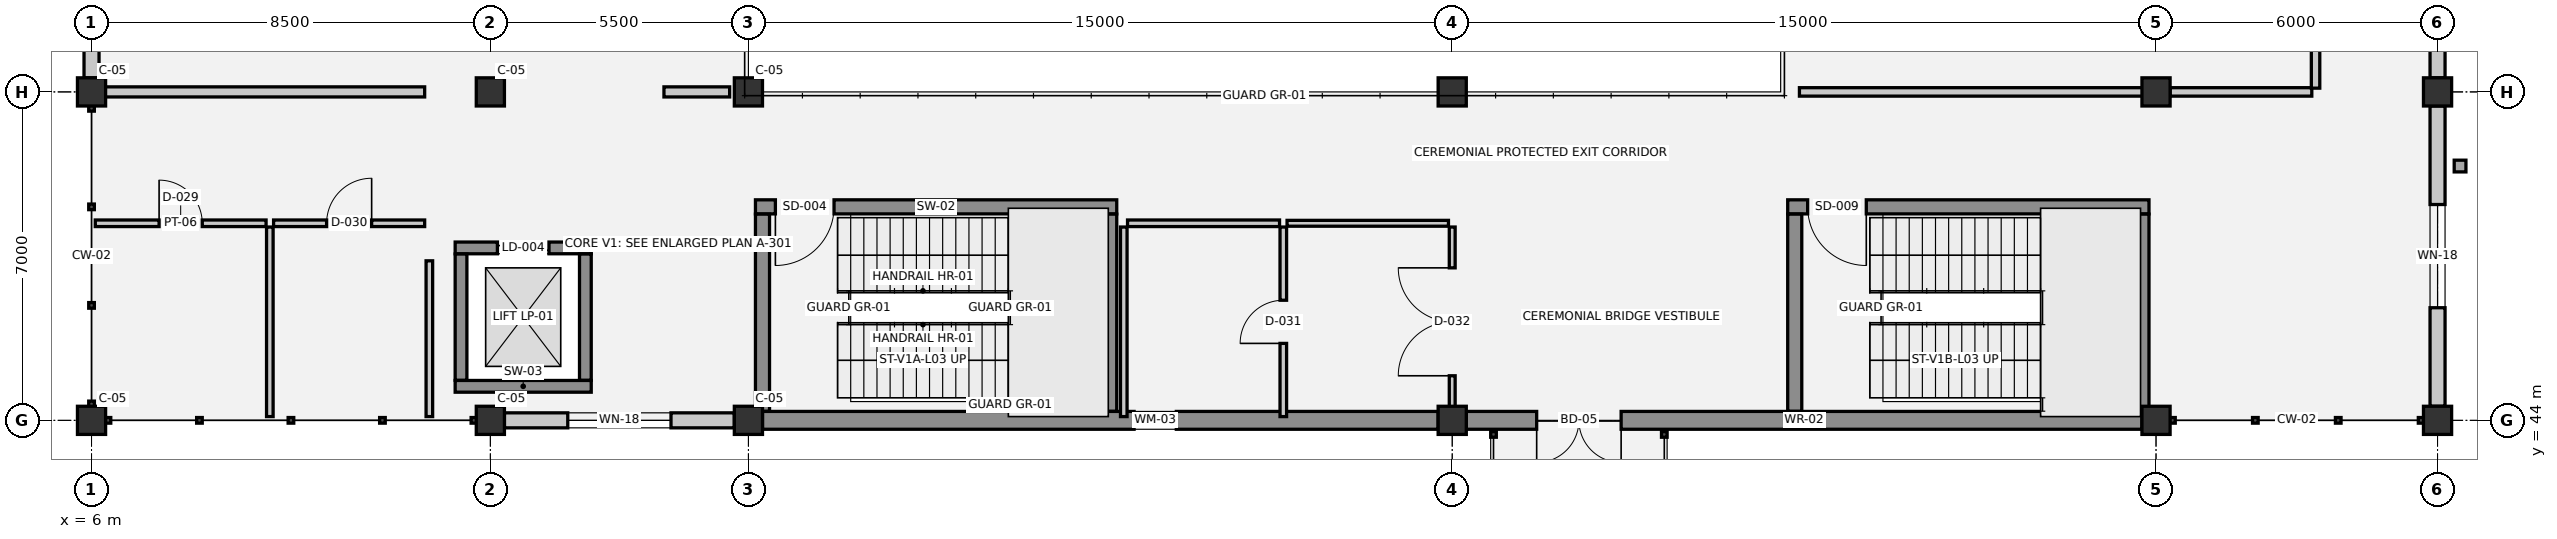
"""IFC4 building model, lengths in metres.
Left out: names, types, materials, properties, quantities, classifications, styles, units other than length and angle.
Written with IfcOpenShell. Run it as: python <this file> out.ifc"""

import sys

from ifc_helpers import new_model, si_unit, direction, frame, frame_2d, origin, origin_2d, place, context, subcontext, project, spatial, rectangle, extrude, element, fill, save


model = new_model("IFC4")
c1 = context("Model", 3, precision=1e-05, world=origin(), true_north=direction((0.0, 1.0)))
c2 = subcontext(c1, "Body", "Model", "MODEL_VIEW")
j1 = project(units=[si_unit("LENGTHUNIT", "METRE"), si_unit("PLANEANGLEUNIT", "RADIAN")], contexts=[c1])
p1 = place(None, origin())
s1 = spatial("IfcSite", under=j1, at=p1, CompositionType="ELEMENT")
p2 = place(p1, origin())
s2 = spatial("IfcBuilding", under=s1, at=p2, CompositionType="ELEMENT")
p3 = place(p2, frame((0.0, 0.0, 9.9)))
s3 = spatial("IfcBuildingStorey", under=s2, at=p3, CompositionType="ELEMENT", Elevation=9.9)
for number, where, z_axis, x_axis in (
    (1, (6.0, 44.0, 0.0), (0.0, 0.0, 1.0), (1.0, 0.0, 0.0)),
    (2, (6.0, 51.0, 0.0), (0.0, 0.0, 1.0), (1.0, 0.0, 0.0)),
    (3, (14.5, 44.0, 0.0), (0.0, 0.0, 1.0), (1.0, 0.0, 0.0)),
    (4, (14.5, 51.0, 0.0), (0.0, 0.0, 1.0), (1.0, 0.0, 0.0)),
    (5, (20.0, 44.0, 0.0), (0.0, 0.0, 1.0), (1.0, 0.0, 0.0)),
    (6, (20.0, 51.0, 0.0), (0.0, 0.0, 1.0), (1.0, 0.0, 0.0)),
    (7, (35.0, 44.0, 0.0), (0.0, 0.0, 1.0), (1.0, 0.0, 0.0)),
    (8, (35.0, 51.0, 0.0), (0.0, 0.0, 1.0), (1.0, 0.0, 0.0)),
    (9, (50.0, 44.0, 0.0), (0.0, 0.0, 1.0), (1.0, 0.0, 0.0)),
    (10, (50.0, 51.0, 0.0), (0.0, 0.0, 1.0), (1.0, 0.0, 0.0)),
    (11, (56.0, 44.0, 0.0), (0.0, 0.0, 1.0), (1.0, 0.0, 0.0)),
    (12, (56.0, 51.0, 0.0), (0.0, 0.0, 1.0), (1.0, 0.0, 0.0)),
):
    element("IfcColumn", number, at=place(p3, frame(where, z_axis=z_axis, x_axis=x_axis)), inside=s3, PredefinedType="COLUMN", context=c2, shape_type="SweptSolid", body=[
        extrude(rectangle(XDim=0.6, YDim=0.6, at=origin_2d()), origin(), (0.0, 0.0, 1.0), 4.5),
    ])
p4 = place(p3, frame((6.0, 51.3, 0.0), z_axis=(0.0, 0.0, 1.0), x_axis=(0.0, 1.0, 0.0)))
e13 = element("IfcWall", 13, at=p4, inside=s3, PredefinedType="SOLIDWALL", context=c2, shape_type="SweptSolid", body=[
    extrude(rectangle(XDim=13.4, YDim=0.32, at=frame_2d((6.7, 0.0))), origin(), (0.0, 0.0, 1.0), 3.11),
])
p5 = place(p4, frame((5.6, 0.0, 0.9)))
e14 = element("IfcOpeningElement", 14, at=p5, cuts=e13, PredefinedType="OPENING", context=c2, shape_type="SweptSolid", body=[
    extrude(rectangle(XDim=2.2, YDim=1.0, at=frame_2d((1.1, 0.5))), frame((0.0, 0.17, 0.0), z_axis=(0.0, -1.0, 0.0), x_axis=(1.0, 0.0, 0.0)), (0.0, 0.0, 1.0), 0.34),
])
p6 = place(p3, frame((56.0, 64.7, 0.0), z_axis=(0.0, 0.0, 1.0), x_axis=(0.0, -1.0, 0.0)))
e15 = element("IfcWall", 15, at=p6, inside=s3, PredefinedType="SOLIDWALL", context=c2, shape_type="SweptSolid", body=[
    extrude(rectangle(XDim=13.4, YDim=0.32, at=frame_2d((6.7, 0.0))), origin(), (0.0, 0.0, 1.0), 3.11),
])
p7 = place(p6, frame((9.975, 0.0, 0.0)))
e16 = element("IfcOpeningElement", 16, at=p7, cuts=e15, PredefinedType="OPENING", context=c2, shape_type="SweptSolid", body=[
    extrude(rectangle(XDim=1.65, YDim=2.2, at=frame_2d((0.825, 1.1))), frame((0.0, 0.17, 0.0), z_axis=(0.0, -1.0, 0.0), x_axis=(1.0, 0.0, 0.0)), (0.0, 0.0, 1.0), 0.34),
])
p8 = place(p3, frame((56.0, 50.7, 0.0), z_axis=(0.0, 0.0, 1.0), x_axis=(0.0, -1.0, 0.0)))
e17 = element("IfcWall", 17, at=p8, inside=s3, PredefinedType="SOLIDWALL", context=c2, shape_type="SweptSolid", body=[
    extrude(rectangle(XDim=6.4, YDim=0.32, at=frame_2d((3.2, 0.0))), origin(), (0.0, 0.0, 1.0), 3.11),
])
p9 = place(p8, frame((2.1, 0.0, 0.9)))
e18 = element("IfcOpeningElement", 18, at=p9, cuts=e17, PredefinedType="OPENING", context=c2, shape_type="SweptSolid", body=[
    extrude(rectangle(XDim=2.2, YDim=1.0, at=frame_2d((1.1, 0.5))), frame((0.0, 0.17, 0.0), z_axis=(0.0, -1.0, 0.0), x_axis=(1.0, 0.0, 0.0)), (0.0, 0.0, 1.0), 0.34),
])
p10 = place(p3, frame((49.7, 44.0, 0.0), z_axis=(0.0, 0.0, 1.0), x_axis=(-1.0, 0.0, 0.0)))
e19 = element("IfcWall", 19, at=p10, inside=s3, PredefinedType="STANDARD", context=c2, shape_type="SweptSolid", body=[
    extrude(rectangle(XDim=14.4, YDim=0.38, at=frame_2d((7.2, 0.0))), origin(), (0.0, 0.0, 1.0), 3.11),
])
p11 = place(p10, frame((11.1, 0.0, 0.0)))
e20 = element("IfcOpeningElement", 20, at=p11, cuts=e19, PredefinedType="OPENING", context=c2, shape_type="SweptSolid", body=[
    extrude(rectangle(XDim=1.8, YDim=2.25, at=frame_2d((0.9, 1.125))), frame((0.0, 0.2, 0.0), z_axis=(0.0, -1.0, 0.0), x_axis=(1.0, 0.0, 0.0)), (0.0, 0.0, 1.0), 0.4),
])
p12 = place(p3, frame((34.7, 44.0, 0.0), z_axis=(0.0, 0.0, 1.0), x_axis=(-1.0, 0.0, 0.0)))
e21 = element("IfcWall", 21, at=p12, inside=s3, PredefinedType="STANDARD", context=c2, shape_type="SweptSolid", body=[
    extrude(rectangle(XDim=14.4, YDim=0.38, at=frame_2d((7.2, 0.0))), origin(), (0.0, 0.0, 1.0), 3.11),
])
p13 = place(p12, frame((5.58, 0.0, 0.95)))
e22 = element("IfcOpeningElement", 22, at=p13, cuts=e21, PredefinedType="OPENING", context=c2, shape_type="SweptSolid", body=[
    extrude(rectangle(XDim=0.9, YDim=1.6, at=frame_2d((0.45, 0.8))), frame((0.0, 0.2, 0.0), z_axis=(0.0, -1.0, 0.0), x_axis=(1.0, 0.0, 0.0)), (0.0, 0.0, 1.0), 0.4),
])
p14 = place(p3, frame((19.7, 44.0, 0.0), z_axis=(0.0, 0.0, 1.0), x_axis=(-1.0, 0.0, 0.0)))
e23 = element("IfcWall", 23, at=p14, inside=s3, PredefinedType="SOLIDWALL", context=c2, shape_type="SweptSolid", body=[
    extrude(rectangle(XDim=4.9, YDim=0.32, at=frame_2d((2.45, 0.0))), origin(), (0.0, 0.0, 1.0), 3.11),
])
p15 = place(p14, frame((1.35, 0.0, 0.9)))
e24 = element("IfcOpeningElement", 24, at=p15, cuts=e23, PredefinedType="OPENING", context=c2, shape_type="SweptSolid", body=[
    extrude(rectangle(XDim=2.2, YDim=1.0, at=frame_2d((1.1, 0.5))), frame((0.0, 0.17, 0.0), z_axis=(0.0, -1.0, 0.0), x_axis=(1.0, 0.0, 0.0)), (0.0, 0.0, 1.0), 0.34),
])
p16 = place(p3, frame((13.75, 44.725, 0.0), z_axis=(0.0, 0.0, 1.0), x_axis=(1.0, 0.0, 0.0)))
e25 = element("IfcWall", 25, at=p16, inside=s3, PredefinedType="SHEAR", context=c2, shape_type="SweptSolid", body=[
    extrude(rectangle(XDim=2.9, YDim=0.25, at=frame_2d((1.45, 0.0))), origin(), (0.0, 0.0, 1.0), 4.5),
])
p17 = place(p3, frame((16.65, 47.675, 0.0), z_axis=(0.0, 0.0, 1.0), x_axis=(-1.0, 0.0, 0.0)))
e26 = element("IfcWall", 26, at=p17, inside=s3, PredefinedType="SHEAR", context=c2, shape_type="SweptSolid", body=[
    extrude(rectangle(XDim=2.9, YDim=0.25, at=frame_2d((1.45, 0.0))), origin(), (0.0, 0.0, 1.0), 4.5),
])
p18 = place(p17, frame((0.9, 0.0, 0.0)))
e27 = element("IfcOpeningElement", 27, at=p18, cuts=e26, PredefinedType="OPENING", context=c2, shape_type="SweptSolid", body=[
    extrude(rectangle(XDim=1.1, YDim=2.15, at=frame_2d((0.55, 1.075))), frame((0.0, 0.135, 0.0), z_axis=(0.0, -1.0, 0.0), x_axis=(1.0, 0.0, 0.0)), (0.0, 0.0, 1.0), 0.27),
])
for number, where, z_axis, x_axis in (
    (28, (13.875, 47.545, 0.0), (0.0, 0.0, 1.0), (0.0, -1.0, 0.0)),
    (29, (16.525, 44.855, 0.0), (0.0, 0.0, 1.0), (0.0, 1.0, 0.0)),
):
    element("IfcWall", number, at=place(p3, frame(where, z_axis=z_axis, x_axis=x_axis)), inside=s3, PredefinedType="SHEAR", context=c2, shape_type="SweptSolid", body=[
        extrude(rectangle(XDim=2.69, YDim=0.25, at=frame_2d((1.345, 0.0))), origin(), (0.0, 0.0, 1.0), 4.5),
    ])
p19 = place(p3, frame((27.85, 48.55, 0.0), z_axis=(0.0, 0.0, 1.0), x_axis=(-1.0, 0.0, 0.0)))
e30 = element("IfcWall", 30, at=p19, inside=s3, PredefinedType="SHEAR", context=c2, shape_type="SweptSolid", body=[
    extrude(rectangle(XDim=7.7, YDim=0.3, at=frame_2d((3.85, 0.0))), origin(), (0.0, 0.0, 1.0), 4.24),
])
p20 = place(p19, frame((6.025, 0.0, 0.0)))
e31 = element("IfcOpeningElement", 31, at=p20, cuts=e30, PredefinedType="OPENING", context=c2, shape_type="SweptSolid", body=[
    extrude(rectangle(XDim=1.25, YDim=2.15, at=frame_2d((0.625, 1.075))), frame((0.0, 0.16, 0.0), z_axis=(0.0, -1.0, 0.0), x_axis=(1.0, 0.0, 0.0)), (0.0, 0.0, 1.0), 0.32),
])
for number, where, z_axis, x_axis in (
    (32, (20.3, 48.395, 0.0), (0.0, 0.0, 1.0), (0.0, -1.0, 0.0)),
    (33, (27.7, 44.195, 0.0), (0.0, 0.0, 1.0), (0.0, 1.0, 0.0)),
):
    element("IfcWall", number, at=place(p3, frame(where, z_axis=z_axis, x_axis=x_axis)), inside=s3, PredefinedType="SHEAR", context=c2, shape_type="SweptSolid", body=[
        extrude(rectangle(XDim=4.2, YDim=0.3, at=frame_2d((2.1, 0.0))), origin(), (0.0, 0.0, 1.0), 4.24),
    ])
p21 = place(p3, frame((49.85, 48.55, 0.0), z_axis=(0.0, 0.0, 1.0), x_axis=(-1.0, 0.0, 0.0)))
e34 = element("IfcWall", 34, at=p21, inside=s3, PredefinedType="SHEAR", context=c2, shape_type="SweptSolid", body=[
    extrude(rectangle(XDim=7.7, YDim=0.3, at=frame_2d((3.85, 0.0))), origin(), (0.0, 0.0, 1.0), 4.24),
])
p22 = place(p21, frame((6.025, 0.0, 0.0)))
e35 = element("IfcOpeningElement", 35, at=p22, cuts=e34, PredefinedType="OPENING", context=c2, shape_type="SweptSolid", body=[
    extrude(rectangle(XDim=1.25, YDim=2.15, at=frame_2d((0.625, 1.075))), frame((0.0, 0.16, 0.0), z_axis=(0.0, -1.0, 0.0), x_axis=(1.0, 0.0, 0.0)), (0.0, 0.0, 1.0), 0.32),
])
for number, where, z_axis, x_axis in (
    (36, (42.3, 48.395, 0.0), (0.0, 0.0, 1.0), (0.0, -1.0, 0.0)),
    (37, (49.7, 44.195, 0.0), (0.0, 0.0, 1.0), (0.0, 1.0, 0.0)),
):
    element("IfcWall", number, at=place(p3, frame(where, z_axis=z_axis, x_axis=x_axis)), inside=s3, PredefinedType="SHEAR", context=c2, shape_type="SweptSolid", body=[
        extrude(rectangle(XDim=4.2, YDim=0.3, at=frame_2d((2.1, 0.0))), origin(), (0.0, 0.0, 1.0), 4.24),
    ])
p23 = place(p3, frame((6.08, 48.2, 0.0), z_axis=(0.0, 0.0, 1.0), x_axis=(1.0, 0.0, 0.0)))
e38 = element("IfcWall", 38, at=p23, inside=s3, PredefinedType="PLUMBINGWALL", context=c2, shape_type="SweptSolid", body=[
    extrude(rectangle(XDim=3.64, YDim=0.14, at=frame_2d((1.82, 0.0))), origin(), (0.0, 0.0, 1.0), 4.14),
])
p24 = place(p23, frame((1.36, 0.0, 0.0)))
e39 = element("IfcOpeningElement", 39, at=p24, cuts=e38, PredefinedType="OPENING", context=c2, shape_type="SweptSolid", body=[
    extrude(rectangle(XDim=0.92, YDim=2.1, at=frame_2d((0.46, 1.05))), frame((0.0, 0.08, 0.0), z_axis=(0.0, -1.0, 0.0), x_axis=(1.0, 0.0, 0.0)), (0.0, 0.0, 1.0), 0.16),
])
p25 = place(p3, frame((9.88, 48.2, 0.0), z_axis=(0.0, 0.0, 1.0), x_axis=(1.0, 0.0, 0.0)))
e40 = element("IfcWall", 40, at=p25, inside=s3, PredefinedType="PLUMBINGWALL", context=c2, shape_type="SweptSolid", body=[
    extrude(rectangle(XDim=3.22, YDim=0.14, at=frame_2d((1.61, 0.0))), origin(), (0.0, 0.0, 1.0), 4.14),
])
p26 = place(p25, frame((1.13, 0.0, 0.0)))
e41 = element("IfcOpeningElement", 41, at=p26, cuts=e40, PredefinedType="OPENING", context=c2, shape_type="SweptSolid", body=[
    extrude(rectangle(XDim=0.96, YDim=2.1, at=frame_2d((0.48, 1.05))), frame((0.0, 0.08, 0.0), z_axis=(0.0, -1.0, 0.0), x_axis=(1.0, 0.0, 0.0)), (0.0, 0.0, 1.0), 0.16),
])
p27 = place(p3, frame((28.08, 48.2, 0.0), z_axis=(0.0, 0.0, 1.0), x_axis=(1.0, 0.0, 0.0)))
e42 = element("IfcWall", 42, at=p27, inside=s3, PredefinedType="PLUMBINGWALL", context=c2, shape_type="SweptSolid", body=[
    extrude(rectangle(XDim=3.24, YDim=0.14, at=frame_2d((1.62, 0.0))), origin(), (0.0, 0.0, 1.0), 4.14),
])
p28 = place(p3, frame((31.48, 48.2, 0.0), z_axis=(0.0, 0.0, 1.0), x_axis=(1.0, 0.0, 0.0)))
e43 = element("IfcWall", 43, at=p28, inside=s3, PredefinedType="PARTITIONING", context=c2, shape_type="SweptSolid", body=[
    extrude(rectangle(XDim=3.44, YDim=0.125, at=frame_2d((1.72, 0.0))), origin(), (0.0, 0.0, 1.0), 4.14),
])
p29 = place(p3, frame((6.08, 51.0, 0.0), z_axis=(0.0, 0.0, 1.0), x_axis=(1.0, 0.0, 0.0)))
e44 = element("IfcWall", 44, at=p29, inside=s3, PredefinedType="PARTITIONING", context=c2, shape_type="SweptSolid", body=[
    extrude(rectangle(XDim=7.02, YDim=0.215, at=frame_2d((3.51, 0.0))), origin(), (0.0, 0.0, 1.0), 3.53),
])
p30 = place(p3, frame((18.2, 51.0, 0.0), z_axis=(0.0, 0.0, 1.0), x_axis=(1.0, 0.0, 0.0)))
e45 = element("IfcWall", 45, at=p30, inside=s3, PredefinedType="PARTITIONING", context=c2, shape_type="SweptSolid", body=[
    extrude(rectangle(XDim=1.4, YDim=0.215, at=frame_2d((0.7, 0.0))), origin(), (0.0, 0.0, 1.0), 3.53),
])
p31 = place(p3, frame((42.4, 51.0, 0.0), z_axis=(0.0, 0.0, 1.0), x_axis=(1.0, 0.0, 0.0)))
e46 = element("IfcWall", 46, at=p31, inside=s3, PredefinedType="PARTITIONING", context=c2, shape_type="SweptSolid", body=[
    extrude(rectangle(XDim=7.9, YDim=0.18, at=frame_2d((3.95, 0.0))), origin(), (0.0, 0.0, 1.0), 3.28),
])
p32 = place(p3, frame((50.3, 51.0, 0.0), z_axis=(0.0, 0.0, 1.0), x_axis=(1.0, 0.0, 0.0)))
e47 = element("IfcWall", 47, at=p32, inside=s3, PredefinedType="PARTITIONING", context=c2, shape_type="SweptSolid", body=[
    extrude(rectangle(XDim=3.02, YDim=0.18, at=frame_2d((1.51, 0.0))), origin(), (0.0, 0.0, 1.0), 3.53),
])
p33 = place(p3, frame((9.8, 44.08, 0.0), z_axis=(0.0, 0.0, 1.0), x_axis=(0.0, 1.0, 0.0)))
e48 = element("IfcWall", 48, at=p33, inside=s3, PredefinedType="PLUMBINGWALL", context=c2, shape_type="SweptSolid", body=[
    extrude(rectangle(XDim=4.04, YDim=0.14, at=frame_2d((2.02, 0.0))), origin(), (0.0, 0.0, 1.0), 4.14),
])
p34 = place(p3, frame((13.2, 44.08, 0.0), z_axis=(0.0, 0.0, 1.0), x_axis=(0.0, 1.0, 0.0)))
e49 = element("IfcWall", 49, at=p34, inside=s3, PredefinedType="PLUMBINGWALL", context=c2, shape_type="SweptSolid", body=[
    extrude(rectangle(XDim=3.32, YDim=0.14, at=frame_2d((1.66, 0.0))), origin(), (0.0, 0.0, 1.0), 4.14),
])
p35 = place(p3, frame((28.0, 44.08, 0.0), z_axis=(0.0, 0.0, 1.0), x_axis=(0.0, 1.0, 0.0)))
e50 = element("IfcWall", 50, at=p35, inside=s3, PredefinedType="PLUMBINGWALL", context=c2, shape_type="SweptSolid", body=[
    extrude(rectangle(XDim=4.04, YDim=0.14, at=frame_2d((2.02, 0.0))), origin(), (0.0, 0.0, 1.0), 4.14),
])
p36 = place(p3, frame((31.4, 44.08, 0.0), z_axis=(0.0, 0.0, 1.0), x_axis=(0.0, 1.0, 0.0)))
e51 = element("IfcWall", 51, at=p36, inside=s3, PredefinedType="PLUMBINGWALL", context=c2, shape_type="SweptSolid", body=[
    extrude(rectangle(XDim=4.04, YDim=0.14, at=frame_2d((2.02, 0.0))), origin(), (0.0, 0.0, 1.0), 4.14),
])
p37 = place(p36, frame((1.56, 0.0, 0.0)))
e52 = element("IfcOpeningElement", 52, at=p37, cuts=e51, PredefinedType="OPENING", context=c2, shape_type="SweptSolid", body=[
    extrude(rectangle(XDim=0.92, YDim=2.1, at=frame_2d((0.46, 1.05))), frame((0.0, 0.08, 0.0), z_axis=(0.0, -1.0, 0.0), x_axis=(1.0, 0.0, 0.0)), (0.0, 0.0, 1.0), 0.16),
])
p38 = place(p3, frame((35.0, 44.08, 0.0), z_axis=(0.0, 0.0, 1.0), x_axis=(0.0, 1.0, 0.0)))
e53 = element("IfcWall", 53, at=p38, inside=s3, PredefinedType="PARTITIONING", context=c2, shape_type="SweptSolid", body=[
    extrude(rectangle(XDim=4.04, YDim=0.125, at=frame_2d((2.02, 0.0))), origin(), (0.0, 0.0, 1.0), 3.58),
])
p39 = place(p38, frame((0.87, 0.0, 0.0)))
e54 = element("IfcOpeningElement", 54, at=p39, cuts=e53, PredefinedType="OPENING", context=c2, shape_type="SweptSolid", body=[
    extrude(rectangle(XDim=2.3, YDim=2.4, at=frame_2d((1.15, 1.2))), frame((0.0, 0.073, 0.0), z_axis=(0.0, -1.0, 0.0), x_axis=(1.0, 0.0, 0.0)), (0.0, 0.0, 1.0), 0.145),
])
p40 = place(p3, frame((53.4, 51.08, 0.0), z_axis=(0.0, 0.0, 1.0), x_axis=(0.0, 1.0, 0.0)))
e55 = element("IfcWall", 55, at=p40, inside=s3, PredefinedType="PARTITIONING", context=c2, shape_type="SweptSolid", body=[
    extrude(rectangle(XDim=13.84, YDim=0.18, at=frame_2d((6.92, 0.0))), origin(), (0.0, 0.0, 1.0), 4.14),
])
p41 = place(p40, frame((6.345, 0.0, 0.0)))
e56 = element("IfcOpeningElement", 56, at=p41, cuts=e55, PredefinedType="OPENING", context=c2, shape_type="SweptSolid", body=[
    extrude(rectangle(XDim=1.15, YDim=2.2, at=frame_2d((0.575, 1.1))), frame((0.0, 0.1, 0.0), z_axis=(0.0, -1.0, 0.0), x_axis=(1.0, 0.0, 0.0)), (0.0, 0.0, 1.0), 0.2),
])
p42 = place(p9, origin())
e57 = element("IfcWindow", 57, at=p42, inside=s3, PartitioningType="SINGLE_PANEL", PredefinedType="WINDOW", context=c2, shape_type="SweptSolid", body=[
    extrude(rectangle(XDim=2.2, YDim=1.0, at=frame_2d((1.1, 0.5))), frame((0.0, 0.03, 0.0), z_axis=(0.0, -1.0, 0.0), x_axis=(1.0, 0.0, 0.0)), (0.0, 0.0, 1.0), 0.06),
])
fill(e18, e57)
p43 = place(p11, origin())
e58 = element("IfcDoor", 58, at=p43, inside=s3, OperationType="DOUBLE_DOOR_SINGLE_SWING", PredefinedType="DOOR", context=c2, shape_type="SweptSolid", body=[
    extrude(rectangle(XDim=1.8, YDim=2.25, at=frame_2d((0.9, 1.125))), frame((0.0, 0.025, 0.0), z_axis=(0.0, -1.0, 0.0), x_axis=(1.0, 0.0, 0.0)), (0.0, 0.0, 1.0), 0.05),
])
fill(e20, e58)
p44 = place(p15, origin())
e59 = element("IfcWindow", 59, at=p44, inside=s3, PartitioningType="SINGLE_PANEL", PredefinedType="WINDOW", context=c2, shape_type="SweptSolid", body=[
    extrude(rectangle(XDim=2.2, YDim=1.0, at=frame_2d((1.1, 0.5))), frame((0.0, 0.03, 0.0), z_axis=(0.0, -1.0, 0.0), x_axis=(1.0, 0.0, 0.0)), (0.0, 0.0, 1.0), 0.06),
])
fill(e24, e59)
p45 = place(p18, origin())
e60 = element("IfcDoor", 60, at=p45, inside=s3, OperationType="DOUBLE_DOOR_SLIDING", PredefinedType="DOOR", context=c2, shape_type="SweptSolid", body=[
    extrude(rectangle(XDim=1.1, YDim=2.15, at=frame_2d((0.55, 1.075))), frame((0.0, 0.025, 0.0), z_axis=(0.0, -1.0, 0.0), x_axis=(1.0, 0.0, 0.0)), (0.0, 0.0, 1.0), 0.05),
])
fill(e27, e60)
p46 = place(p20, origin())
e61 = element("IfcDoor", 61, at=p46, inside=s3, OperationType="SINGLE_SWING_RIGHT", PredefinedType="DOOR", context=c2, shape_type="SweptSolid", body=[
    extrude(rectangle(XDim=1.25, YDim=2.15, at=frame_2d((0.625, 1.075))), frame((0.0, 0.025, 0.0), z_axis=(0.0, -1.0, 0.0), x_axis=(1.0, 0.0, 0.0)), (0.0, 0.0, 1.0), 0.05),
])
fill(e31, e61)
p47 = place(p22, origin())
e62 = element("IfcDoor", 62, at=p47, inside=s3, OperationType="SINGLE_SWING_LEFT", PredefinedType="DOOR", context=c2, shape_type="SweptSolid", body=[
    extrude(rectangle(XDim=1.25, YDim=2.15, at=frame_2d((0.625, 1.075))), frame((0.0, 0.025, 0.0), z_axis=(0.0, -1.0, 0.0), x_axis=(1.0, 0.0, 0.0)), (0.0, 0.0, 1.0), 0.05),
])
fill(e35, e62)
p48 = place(p24, origin())
e63 = element("IfcDoor", 63, at=p48, inside=s3, OperationType="SINGLE_SWING_LEFT", PredefinedType="DOOR", context=c2, shape_type="SweptSolid", body=[
    extrude(rectangle(XDim=0.92, YDim=2.1, at=frame_2d((0.46, 1.05))), frame((0.0, 0.025, 0.0), z_axis=(0.0, -1.0, 0.0), x_axis=(1.0, 0.0, 0.0)), (0.0, 0.0, 1.0), 0.05),
])
fill(e39, e63)
p49 = place(p26, origin())
e64 = element("IfcDoor", 64, at=p49, inside=s3, OperationType="SINGLE_SWING_RIGHT", PredefinedType="DOOR", context=c2, shape_type="SweptSolid", body=[
    extrude(rectangle(XDim=0.96, YDim=2.1, at=frame_2d((0.48, 1.05))), frame((0.0, 0.025, 0.0), z_axis=(0.0, -1.0, 0.0), x_axis=(1.0, 0.0, 0.0)), (0.0, 0.0, 1.0), 0.05),
])
fill(e41, e64)
p50 = place(p37, origin())
e65 = element("IfcDoor", 65, at=p50, inside=s3, OperationType="SINGLE_SWING_LEFT", PredefinedType="DOOR", context=c2, shape_type="SweptSolid", body=[
    extrude(rectangle(XDim=0.92, YDim=2.1, at=frame_2d((0.46, 1.05))), frame((0.0, 0.025, 0.0), z_axis=(0.0, -1.0, 0.0), x_axis=(1.0, 0.0, 0.0)), (0.0, 0.0, 1.0), 0.05),
])
fill(e52, e65)
p51 = place(p39, origin())
e66 = element("IfcDoor", 66, at=p51, inside=s3, OperationType="DOUBLE_DOOR_SINGLE_SWING", PredefinedType="DOOR", context=c2, shape_type="SweptSolid", body=[
    extrude(rectangle(XDim=2.3, YDim=2.4, at=frame_2d((1.15, 1.2))), frame((0.0, 0.025, 0.0), z_axis=(0.0, -1.0, 0.0), x_axis=(1.0, 0.0, 0.0)), (0.0, 0.0, 1.0), 0.05),
])
fill(e54, e66)
p52 = place(p13, origin())
e67 = element("IfcWindow", 67, at=p52, inside=s3, PartitioningType="SINGLE_PANEL", PredefinedType="WINDOW", context=c2, shape_type="SweptSolid", body=[
    extrude(rectangle(XDim=0.9, YDim=1.6, at=frame_2d((0.45, 0.8))), frame((0.0, 0.03, 0.0), z_axis=(0.0, -1.0, 0.0), x_axis=(1.0, 0.0, 0.0)), (0.0, 0.0, 1.0), 0.06),
])
fill(e22, e67)
save(model, sys.argv[1])
